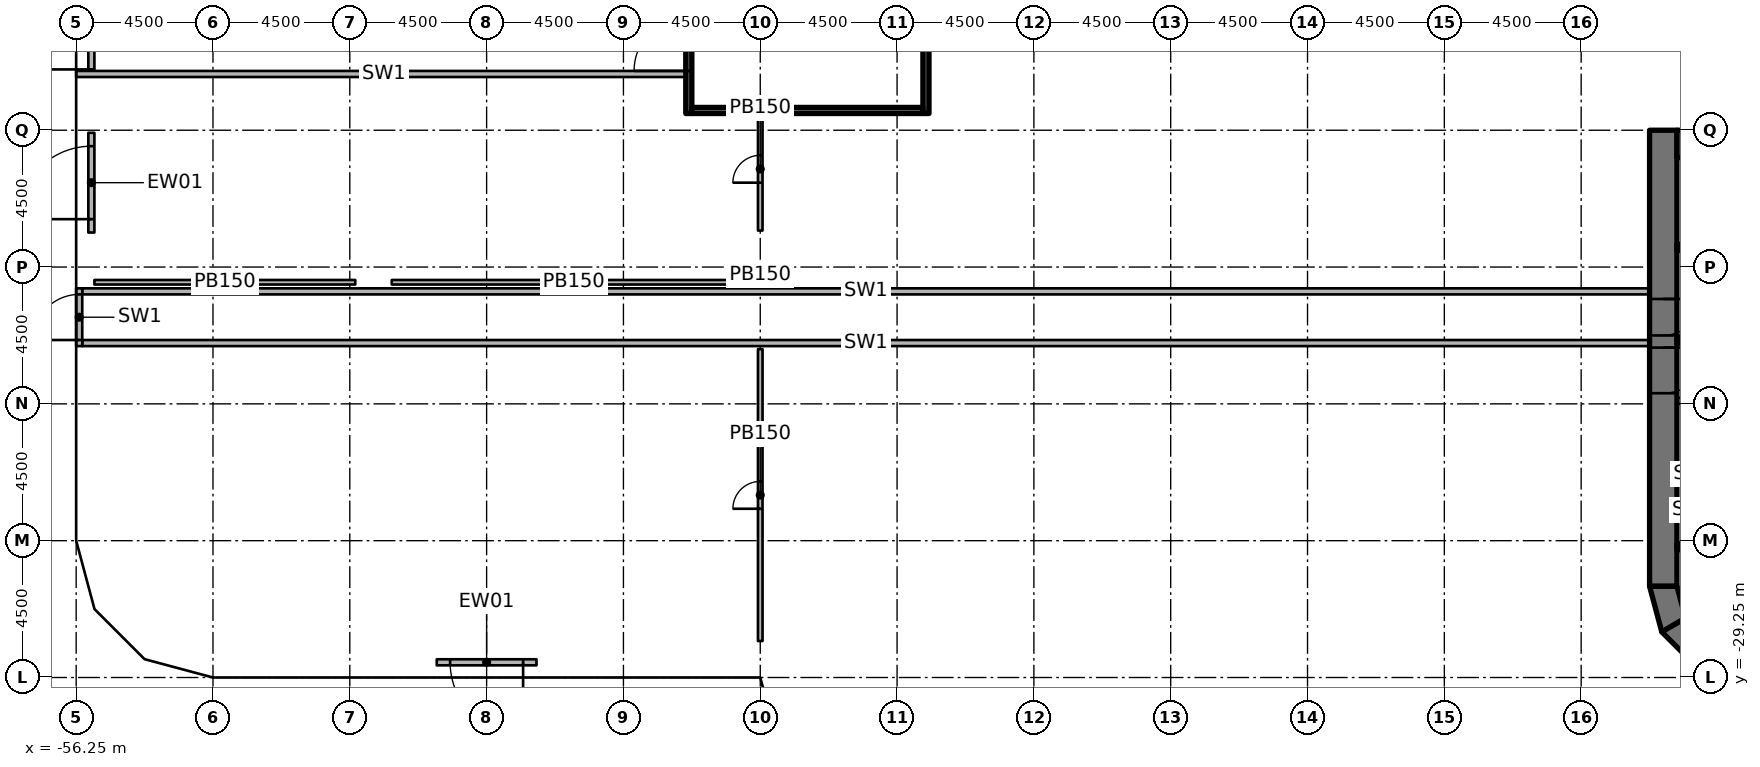
"""IFC4 building model, lengths in metres.
Left out: names, types, materials, properties, quantities, classifications, styles, units other than length and angle.
Written with IfcOpenShell. Run it as: python <this file> out.ifc"""

import sys

from ifc_helpers import new_model, si_unit, direction, frame, frame_2d, origin, origin_2d, place, context, subcontext, project, spatial, polyline, rectangle, outline, extrude, element, fill, save


model = new_model("IFC4")
c1 = context("Model", 3, precision=1e-05, world=origin(), true_north=direction((0.0, 1.0)))
c2 = subcontext(c1, "Body", "Model", "MODEL_VIEW")
j1 = project(units=[si_unit("LENGTHUNIT", "METRE"), si_unit("PLANEANGLEUNIT", "RADIAN")], contexts=[c1])
p1 = place(None, origin())
s1 = spatial("IfcSite", under=j1, at=p1, CompositionType="ELEMENT")
p2 = place(p1, origin())
s2 = spatial("IfcBuilding", under=s1, at=p2, CompositionType="ELEMENT")
p3 = place(p2, origin())
s3 = spatial("IfcBuildingStorey", under=s2, at=p3, CompositionType="ELEMENT", Elevation=0.0)
for number, where, z_axis, x_axis in (
    (1, (-55.65, -20.25, 0.0), (0.0, 0.0, 1.0), (1.0, 0.0, 0.0)),
    (2, (-51.15, -11.25, 0.0), (0.0, 0.0, 1.0), (1.0, 0.0, 0.0)),
    (3, (-47.25, -28.65, 0.0), (0.0, 0.0, 1.0), (1.0, 0.0, 0.0)),
    (4, (-46.47, -15.75, 0.0), (0.0, 0.0, 1.0), (1.0, 0.0, 0.0)),
    (5, (-42.75, -19.47, 0.0), (0.0, 0.0, 1.0), (1.0, 0.0, 0.0)),
    (6, (-38.25, -24.15, 0.0), (0.0, 0.0, 1.0), (1.0, 0.0, 0.0)),
    (7, (-33.15, -28.65, 0.0), (0.0, 0.0, 1.0), (1.0, 0.0, 0.0)),
    (8, (-33.75, -15.15, 0.0), (0.0, 0.0, 1.0), (1.0, 0.0, 0.0)),
    (9, (-28.65, -24.15, 0.0), (0.0, 0.0, 1.0), (1.0, 0.0, 0.0)),
    (10, (-29.25, -19.65, 0.0), (0.0, 0.0, 1.0), (1.0, 0.0, 0.0)),
    (11, (-24.15, -28.65, 0.0), (0.0, 0.0, 1.0), (1.0, 0.0, 0.0)),
    (12, (-24.15, -19.65, 0.0), (0.0, 0.0, 1.0), (1.0, 0.0, 0.0)),
    (13, (-24.75, -10.65, 0.0), (0.0, 0.0, 1.0), (1.0, 0.0, 0.0)),
    (14, (-19.65, -29.25, 0.0), (0.0, 0.0, 1.0), (1.0, 0.0, 0.0)),
    (15, (-19.65, -24.15, 0.0), (0.0, 0.0, 1.0), (1.0, 0.0, 0.0)),
    (16, (-19.65, -15.15, 0.0), (0.0, 0.0, 1.0), (1.0, 0.0, 0.0)),
    (17, (-15.15, -19.65, 0.0), (0.0, 0.0, 1.0), (1.0, 0.0, 0.0)),
    (18, (-15.15, -10.65, 0.0), (0.0, 0.0, 1.0), (1.0, 0.0, 0.0)),
    (19, (-10.65, -24.75, 0.0), (0.0, 0.0, 1.0), (1.0, 0.0, 0.0)),
    (20, (-10.65, -15.15, 0.0), (0.0, 0.0, 1.0), (1.0, 0.0, 0.0)),
    (21, (-6.25, -26.9, 0.0), (0.0, 0.0, 1.0), (1.0, 0.0, 0.0)),
    (22, (-6.25, -24.65, 0.0), (0.0, 0.0, 1.0), (1.0, 0.0, 0.0)),
    (23, (-6.25, -20.25, 0.0), (0.0, 0.0, 1.0), (1.0, 0.0, 0.0)),
    (24, (-6.25, -15.75, 0.0), (0.0, 0.0, 1.0), (1.0, 0.0, 0.0)),
    (25, (-6.25, -10.75, 0.0), (0.0, 0.0, 1.0), (1.0, 0.0, 0.0)),
):
    element("IfcColumn", number, at=place(p3, frame(where, z_axis=z_axis, x_axis=x_axis)), inside=s3, PredefinedType="COLUMN", context=c2, shape_type="SweptSolid", body=[
        extrude(rectangle(XDim=1.2, YDim=1.2, at=origin_2d()), origin(), (0.0, 0.0, 1.0), 6.55),
    ])
p4 = place(p3, frame((-4.05, -11.25, 0.0), z_axis=(0.0, 0.0, 1.0), x_axis=(0.0, -1.0, 0.0)))
e26 = element("IfcWall", 26, at=p4, inside=s3, PredefinedType="SHEAR", context=c2, shape_type="SweptSolid", body=[
    extrude(rectangle(XDim=15.0, YDim=0.9, at=frame_2d((7.5, 0.0))), origin(), (0.0, 0.0, 1.0), 7.0),
])
p5 = place(p4, frame((7.15, 0.0, 0.0)))
e27 = element("IfcOpeningElement", 27, at=p5, cuts=e26, PredefinedType="OPENING", context=c2, shape_type="SweptSolid", body=[
    extrude(rectangle(XDim=1.5, YDim=2.3, at=frame_2d((0.75, 1.15))), frame((0.0, 0.46, 0.0), z_axis=(0.0, -1.0, 0.0), x_axis=(1.0, 0.0, 0.0)), (0.0, 0.0, 1.0), 0.92),
])
p6 = place(p4, frame((5.55, 0.0, 0.0)))
e28 = element("IfcOpeningElement", 28, at=p6, cuts=e26, PredefinedType="OPENING", context=c2, shape_type="SweptSolid", body=[
    extrude(rectangle(XDim=1.2, YDim=2.1, at=frame_2d((0.6, 1.05))), frame((0.0, 0.46, 0.0), z_axis=(0.0, -1.0, 0.0), x_axis=(1.0, 0.0, 0.0)), (0.0, 0.0, 1.0), 0.92),
])
p7 = place(p3, frame((-3.6, -11.7, 0.0), z_axis=(0.0, 0.0, 1.0), x_axis=(1.0, 0.0, 0.0)))
e29 = element("IfcWall", 29, at=p7, inside=s3, PredefinedType="SHEAR", context=c2, shape_type="SweptSolid", body=[
    extrude(rectangle(XDim=7.2, YDim=0.9, at=frame_2d((3.6, 0.0))), origin(), (0.0, 0.0, 1.0), 7.0),
])
p8 = place(p3, origin())
e30 = element("IfcWall", 30, at=p8, inside=s3, PredefinedType="SHEAR", context=c2, shape_type="SweptSolid", body=[
    extrude(outline(polyline([(-4.5, -26.25), (-4.098, -27.75), (-3.319, -27.3), (-3.6, -26.25), (-4.5, -26.25)])), origin(), (0.0, 0.0, 1.0), 7.0),
])
p9 = place(p3, origin())
e31 = element("IfcWall", 31, at=p9, inside=s3, PredefinedType="SHEAR", context=c2, shape_type="SweptSolid", body=[
    extrude(outline(polyline([(-4.098, -27.75), (-3.0, -28.848), (-2.55, -28.069), (-3.319, -27.3), (-4.098, -27.75)])), origin(), (0.0, 0.0, 1.0), 7.0),
])
p10 = place(p3, frame((-41.11, -28.75, 0.0), z_axis=(0.0, 0.0, 1.0), x_axis=(-1.0, 0.0, 0.0)))
e32 = element("IfcWall", 32, at=p10, inside=s3, PredefinedType="SOLIDWALL", context=c2, shape_type="SweptSolid", body=[
    extrude(rectangle(XDim=3.28, YDim=0.2, at=frame_2d((1.64, 0.0))), origin(), (0.0, 0.0, 1.0), 5.6),
])
p11 = place(p10, frame((0.44, 0.0, 0.0)))
e33 = element("IfcOpeningElement", 33, at=p11, cuts=e32, PredefinedType="OPENING", context=c2, shape_type="SweptSolid", body=[
    extrude(rectangle(XDim=2.4, YDim=2.7, at=frame_2d((1.2, 1.35))), frame((0.0, 0.11, 0.0), z_axis=(0.0, -1.0, 0.0), x_axis=(1.0, 0.0, 0.0)), (0.0, 0.0, 1.0), 0.22),
])
p12 = place(p3, frame((-55.75, -14.615, 0.0), z_axis=(0.0, 0.0, 1.0), x_axis=(0.0, 1.0, 0.0)))
e34 = element("IfcWall", 34, at=p12, inside=s3, PredefinedType="SOLIDWALL", context=c2, shape_type="SweptSolid", body=[
    extrude(rectangle(XDim=3.28, YDim=0.2, at=frame_2d((1.64, 0.0))), origin(), (0.0, 0.0, 1.0), 5.6),
])
p13 = place(p12, frame((0.44, 0.0, 0.0)))
e35 = element("IfcOpeningElement", 35, at=p13, cuts=e34, PredefinedType="OPENING", context=c2, shape_type="SweptSolid", body=[
    extrude(rectangle(XDim=2.4, YDim=2.7, at=frame_2d((1.2, 1.35))), frame((0.0, 0.11, 0.0), z_axis=(0.0, -1.0, 0.0), x_axis=(1.0, 0.0, 0.0)), (0.0, 0.0, 1.0), 0.22),
])
p14 = place(p3, frame((-55.75, -9.3, 0.0), z_axis=(0.0, 0.0, 1.0), x_axis=(0.0, 1.0, 0.0)))
e36 = element("IfcWall", 36, at=p14, inside=s3, PredefinedType="SOLIDWALL", context=c2, shape_type="SweptSolid", body=[
    extrude(rectangle(XDim=1.8, YDim=0.2, at=frame_2d((0.9, 0.0))), origin(), (0.0, 0.0, 1.0), 3.0),
])
p15 = place(p14, frame((0.05, 0.0, 0.0)))
e37 = element("IfcOpeningElement", 37, at=p15, cuts=e36, PredefinedType="OPENING", context=c2, shape_type="SweptSolid", body=[
    extrude(rectangle(XDim=1.7, YDim=2.1, at=frame_2d((0.85, 1.05))), frame((0.0, 0.11, 0.0), z_axis=(0.0, -1.0, 0.0), x_axis=(1.0, 0.0, 0.0)), (0.0, 0.0, 1.0), 0.22),
])
for number, where, z_axis, x_axis in (
    (38, (3.6, -24.95, 0.0), (0.0, 0.0, 1.0), (-1.0, 0.0, 0.0)),
    (39, (3.6, -18.15, 0.0), (0.0, 0.0, 1.0), (-1.0, 0.0, 0.0)),
    (40, (3.6, -15.1, 0.0), (0.0, 0.0, 1.0), (-1.0, 0.0, 0.0)),
):
    element("IfcWall", number, at=place(p3, frame(where, z_axis=z_axis, x_axis=x_axis)), inside=s3, PredefinedType="SHEAR", context=c2, shape_type="SweptSolid", body=[
        extrude(rectangle(XDim=7.2, YDim=0.2, at=frame_2d((3.6, 0.0))), origin(), (0.0, 0.0, 1.0), 6.55),
    ])
p16 = place(p3, frame((-0.9, -20.15, 0.0), z_axis=(0.0, 0.0, 1.0), x_axis=(-1.0, 0.0, 0.0)))
e41 = element("IfcWall", 41, at=p16, inside=s3, PredefinedType="PARTITIONING", context=c2, shape_type="SweptSolid", body=[
    extrude(rectangle(XDim=2.7, YDim=0.2, at=frame_2d((1.35, 0.0))), origin(), (0.0, 0.0, 1.0), 6.55),
])
p17 = place(p3, frame((-1.1, -22.55, 0.0), z_axis=(0.0, 0.0, 1.0), x_axis=(-1.0, 0.0, 0.0)))
e42 = element("IfcWall", 42, at=p17, inside=s3, PredefinedType="PARTITIONING", context=c2, shape_type="SweptSolid", body=[
    extrude(rectangle(XDim=2.5, YDim=0.2, at=frame_2d((1.25, 0.0))), origin(), (0.0, 0.0, 1.0), 6.55),
])
for number, where, z_axis, x_axis in (
    (43, (-4.5, -18.25, 0.0), (0.0, 0.0, 1.0), (-1.0, 0.0, 0.0)),
    (44, (-4.5, -16.55, 0.0), (0.0, 0.0, 1.0), (-1.0, 0.0, 0.0)),
):
    element("IfcWall", number, at=place(p3, frame(where, z_axis=z_axis, x_axis=x_axis)), inside=s3, PredefinedType="PARTITIONING", context=c2, shape_type="SweptSolid", body=[
        extrude(rectangle(XDim=51.55, YDim=0.2, at=frame_2d((25.775, 0.0))), origin(), (0.0, 0.0, 1.0), 6.55),
    ])
p18 = place(p3, frame((-56.15, -18.35, 0.0), z_axis=(0.0, 0.0, 1.0), x_axis=(0.0, 1.0, 0.0)))
e45 = element("IfcWall", 45, at=p18, inside=s3, PredefinedType="PARTITIONING", context=c2, shape_type="SweptSolid", body=[
    extrude(rectangle(XDim=1.9, YDim=0.2, at=frame_2d((0.95, 0.0))), origin(), (0.0, 0.0, 1.0), 6.55),
])
p19 = place(p18, frame((0.2, 0.0, 0.0)))
e46 = element("IfcOpeningElement", 46, at=p19, cuts=e45, PredefinedType="OPENING", context=c2, shape_type="SweptSolid", body=[
    extrude(rectangle(XDim=1.5, YDim=2.1, at=frame_2d((0.75, 1.05))), frame((0.0, 0.11, 0.0), z_axis=(0.0, -1.0, 0.0), x_axis=(1.0, 0.0, 0.0)), (0.0, 0.0, 1.0), 0.22),
])
p20 = place(p3, frame((-36.1, -10.7, 0.0), z_axis=(0.0, 0.0, 1.0), x_axis=(0.0, 1.0, 0.0)))
e47 = element("IfcWall", 47, at=p20, inside=s3, PredefinedType="SHEAR", context=c2, shape_type="SweptSolid", body=[
    extrude(rectangle(XDim=4.6, YDim=0.2, at=frame_2d((2.3, 0.0))), origin(), (0.0, 0.0, 1.0), 6.55),
])
p21 = place(p20, frame((1.4, 0.0, 0.0)))
e48 = element("IfcOpeningElement", 48, at=p21, cuts=e47, PredefinedType="OPENING", context=c2, shape_type="SweptSolid", body=[
    extrude(rectangle(XDim=1.8, YDim=2.1, at=frame_2d((0.9, 1.05))), frame((0.0, 0.11, 0.0), z_axis=(0.0, -1.0, 0.0), x_axis=(1.0, 0.0, 0.0)), (0.0, 0.0, 1.0), 0.22),
])
p22 = place(p3, frame((-28.3, -10.7, 0.0), z_axis=(0.0, 0.0, 1.0), x_axis=(0.0, 1.0, 0.0)))
e49 = element("IfcWall", 49, at=p22, inside=s3, PredefinedType="SHEAR", context=c2, shape_type="SweptSolid", body=[
    extrude(rectangle(XDim=4.6, YDim=0.2, at=frame_2d((2.3, 0.0))), origin(), (0.0, 0.0, 1.0), 6.55),
])
p23 = place(p3, frame((-36.0, -10.6, 0.0), z_axis=(0.0, 0.0, 1.0), x_axis=(1.0, 0.0, 0.0)))
e50 = element("IfcWall", 50, at=p23, inside=s3, PredefinedType="SHEAR", context=c2, shape_type="SweptSolid", body=[
    extrude(rectangle(XDim=7.6, YDim=0.2, at=frame_2d((3.8, 0.0))), origin(), (0.0, 0.0, 1.0), 6.55),
])
p24 = place(p3, frame((-56.25, -9.4, 0.0), z_axis=(0.0, 0.0, 1.0), x_axis=(1.0, 0.0, 0.0)))
e51 = element("IfcWall", 51, at=p24, inside=s3, PredefinedType="PARTITIONING", context=c2, shape_type="SweptSolid", body=[
    extrude(rectangle(XDim=20.25, YDim=0.2, at=frame_2d((10.125, 0.0))), origin(), (0.0, 0.0, 1.0), 6.55),
])
p25 = place(p3, frame((-33.75, -28.05, 0.0), z_axis=(0.0, 0.0, 1.0), x_axis=(0.0, 1.0, 0.0)))
e52 = element("IfcWall", 52, at=p25, inside=s3, PredefinedType="PARTITIONING", context=c2, shape_type="SweptSolid", body=[
    extrude(rectangle(XDim=9.6, YDim=0.15, at=frame_2d((4.8, 0.0))), origin(), (0.0, 0.0, 1.0), 6.55),
])
p26 = place(p25, frame((4.35, 0.0, 0.0)))
e53 = element("IfcOpeningElement", 53, at=p26, cuts=e52, PredefinedType="OPENING", context=c2, shape_type="SweptSolid", body=[
    extrude(rectangle(XDim=0.9, YDim=2.1, at=frame_2d((0.45, 1.05))), frame((0.0, 0.085, 0.0), z_axis=(0.0, -1.0, 0.0), x_axis=(1.0, 0.0, 0.0)), (0.0, 0.0, 1.0), 0.17),
])
p27 = place(p3, frame((-33.75, -14.55, 0.0), z_axis=(0.0, 0.0, 1.0), x_axis=(0.0, 1.0, 0.0)))
e54 = element("IfcWall", 54, at=p27, inside=s3, PredefinedType="PARTITIONING", context=c2, shape_type="SweptSolid", body=[
    extrude(rectangle(XDim=4.05, YDim=0.15, at=frame_2d((2.025, 0.0))), origin(), (0.0, 0.0, 1.0), 6.55),
])
p28 = place(p27, frame((1.575, 0.0, 0.0)))
e55 = element("IfcOpeningElement", 55, at=p28, cuts=e54, PredefinedType="OPENING", context=c2, shape_type="SweptSolid", body=[
    extrude(rectangle(XDim=0.9, YDim=2.1, at=frame_2d((0.45, 1.05))), frame((0.0, 0.085, 0.0), z_axis=(0.0, -1.0, 0.0), x_axis=(1.0, 0.0, 0.0)), (0.0, 0.0, 1.0), 0.17),
])
p29 = place(p3, frame((-33.75, -15.75, 0.0), z_axis=(0.0, 0.0, 1.0), x_axis=(0.0, -1.0, 0.0)))
e56 = element("IfcWall", 56, at=p29, inside=s3, PredefinedType="PARTITIONING", context=c2, shape_type="SweptSolid", body=[
    extrude(rectangle(XDim=0.5, YDim=0.15, at=frame_2d((0.25, 0.0))), origin(), (0.0, 0.0, 1.0), 6.55),
])
p30 = place(p3, frame((-33.9, -16.25, 0.0), z_axis=(0.0, 0.0, 1.0), x_axis=(-1.0, 0.0, 0.0)))
e57 = element("IfcWall", 57, at=p30, inside=s3, PredefinedType="PARTITIONING", context=c2, shape_type="SweptSolid", body=[
    extrude(rectangle(XDim=11.97, YDim=0.15, at=frame_2d((5.985, 0.0))), origin(), (0.0, 0.0, 1.0), 6.55),
])
p31 = place(p3, frame((-47.07, -16.25, 0.0), z_axis=(0.0, 0.0, 1.0), x_axis=(-1.0, 0.0, 0.0)))
e58 = element("IfcWall", 58, at=p31, inside=s3, PredefinedType="PARTITIONING", context=c2, shape_type="SweptSolid", body=[
    extrude(rectangle(XDim=8.58, YDim=0.15, at=frame_2d((4.29, 0.0))), origin(), (0.0, 0.0, 1.0), 6.55),
])
p32 = place(p11, origin())
e59 = element("IfcDoor", 59, at=p32, inside=s3, OperationType="SINGLE_SWING_LEFT", PredefinedType="DOOR", context=c2, shape_type="SweptSolid", body=[
    extrude(rectangle(XDim=2.4, YDim=2.7, at=frame_2d((1.2, 1.35))), frame((0.0, 0.025, 0.0), z_axis=(0.0, -1.0, 0.0), x_axis=(1.0, 0.0, 0.0)), (0.0, 0.0, 1.0), 0.05),
])
fill(e33, e59)
p33 = place(p13, origin())
e60 = element("IfcDoor", 60, at=p33, inside=s3, OperationType="SINGLE_SWING_LEFT", PredefinedType="DOOR", context=c2, shape_type="SweptSolid", body=[
    extrude(rectangle(XDim=2.4, YDim=2.7, at=frame_2d((1.2, 1.35))), frame((0.0, 0.025, 0.0), z_axis=(0.0, -1.0, 0.0), x_axis=(1.0, 0.0, 0.0)), (0.0, 0.0, 1.0), 0.05),
])
fill(e35, e60)
p34 = place(p15, origin())
e61 = element("IfcDoor", 61, at=p34, inside=s3, OperationType="SINGLE_SWING_LEFT", PredefinedType="DOOR", context=c2, shape_type="SweptSolid", body=[
    extrude(rectangle(XDim=1.7, YDim=2.1, at=frame_2d((0.85, 1.05))), frame((0.0, 0.025, 0.0), z_axis=(0.0, -1.0, 0.0), x_axis=(1.0, 0.0, 0.0)), (0.0, 0.0, 1.0), 0.05),
])
fill(e37, e61)
p35 = place(p5, origin())
e62 = element("IfcDoor", 62, at=p35, inside=s3, OperationType="DOUBLE_DOOR_SINGLE_SWING", PredefinedType="DOOR", context=c2, shape_type="SweptSolid", body=[
    extrude(rectangle(XDim=1.5, YDim=2.3, at=frame_2d((0.75, 1.15))), frame((0.0, 0.025, 0.0), z_axis=(0.0, -1.0, 0.0), x_axis=(1.0, 0.0, 0.0)), (0.0, 0.0, 1.0), 0.05),
])
fill(e27, e62)
p36 = place(p6, origin())
e63 = element("IfcDoor", 63, at=p36, inside=s3, OperationType="SINGLE_SWING_LEFT", PredefinedType="DOOR", context=c2, shape_type="SweptSolid", body=[
    extrude(rectangle(XDim=1.2, YDim=2.1, at=frame_2d((0.6, 1.05))), frame((0.0, 0.025, 0.0), z_axis=(0.0, -1.0, 0.0), x_axis=(1.0, 0.0, 0.0)), (0.0, 0.0, 1.0), 0.05),
])
fill(e28, e63)
p37 = place(p19, origin())
e64 = element("IfcDoor", 64, at=p37, inside=s3, OperationType="DOUBLE_DOOR_DOUBLE_SWING", PredefinedType="DOOR", context=c2, shape_type="SweptSolid", body=[
    extrude(rectangle(XDim=1.5, YDim=2.1, at=frame_2d((0.75, 1.05))), frame((0.0, 0.025, 0.0), z_axis=(0.0, -1.0, 0.0), x_axis=(1.0, 0.0, 0.0)), (0.0, 0.0, 1.0), 0.05),
])
fill(e46, e64)
p38 = place(p21, origin())
e65 = element("IfcDoor", 65, at=p38, inside=s3, OperationType="DOUBLE_DOOR_SINGLE_SWING", PredefinedType="DOOR", context=c2, shape_type="SweptSolid", body=[
    extrude(rectangle(XDim=1.8, YDim=2.1, at=frame_2d((0.9, 1.05))), frame((0.0, 0.025, 0.0), z_axis=(0.0, -1.0, 0.0), x_axis=(1.0, 0.0, 0.0)), (0.0, 0.0, 1.0), 0.05),
])
fill(e48, e65)
p39 = place(p26, origin())
e66 = element("IfcDoor", 66, at=p39, inside=s3, OperationType="SINGLE_SWING_LEFT", PredefinedType="DOOR", context=c2, shape_type="SweptSolid", body=[
    extrude(rectangle(XDim=0.9, YDim=2.1, at=frame_2d((0.45, 1.05))), frame((0.0, 0.025, 0.0), z_axis=(0.0, -1.0, 0.0), x_axis=(1.0, 0.0, 0.0)), (0.0, 0.0, 1.0), 0.05),
])
fill(e53, e66)
p40 = place(p28, origin())
e67 = element("IfcDoor", 67, at=p40, inside=s3, OperationType="SINGLE_SWING_LEFT", PredefinedType="DOOR", context=c2, shape_type="SweptSolid", body=[
    extrude(rectangle(XDim=0.9, YDim=2.1, at=frame_2d((0.45, 1.05))), frame((0.0, 0.025, 0.0), z_axis=(0.0, -1.0, 0.0), x_axis=(1.0, 0.0, 0.0)), (0.0, 0.0, 1.0), 0.05),
])
fill(e55, e67)
save(model, sys.argv[1])
